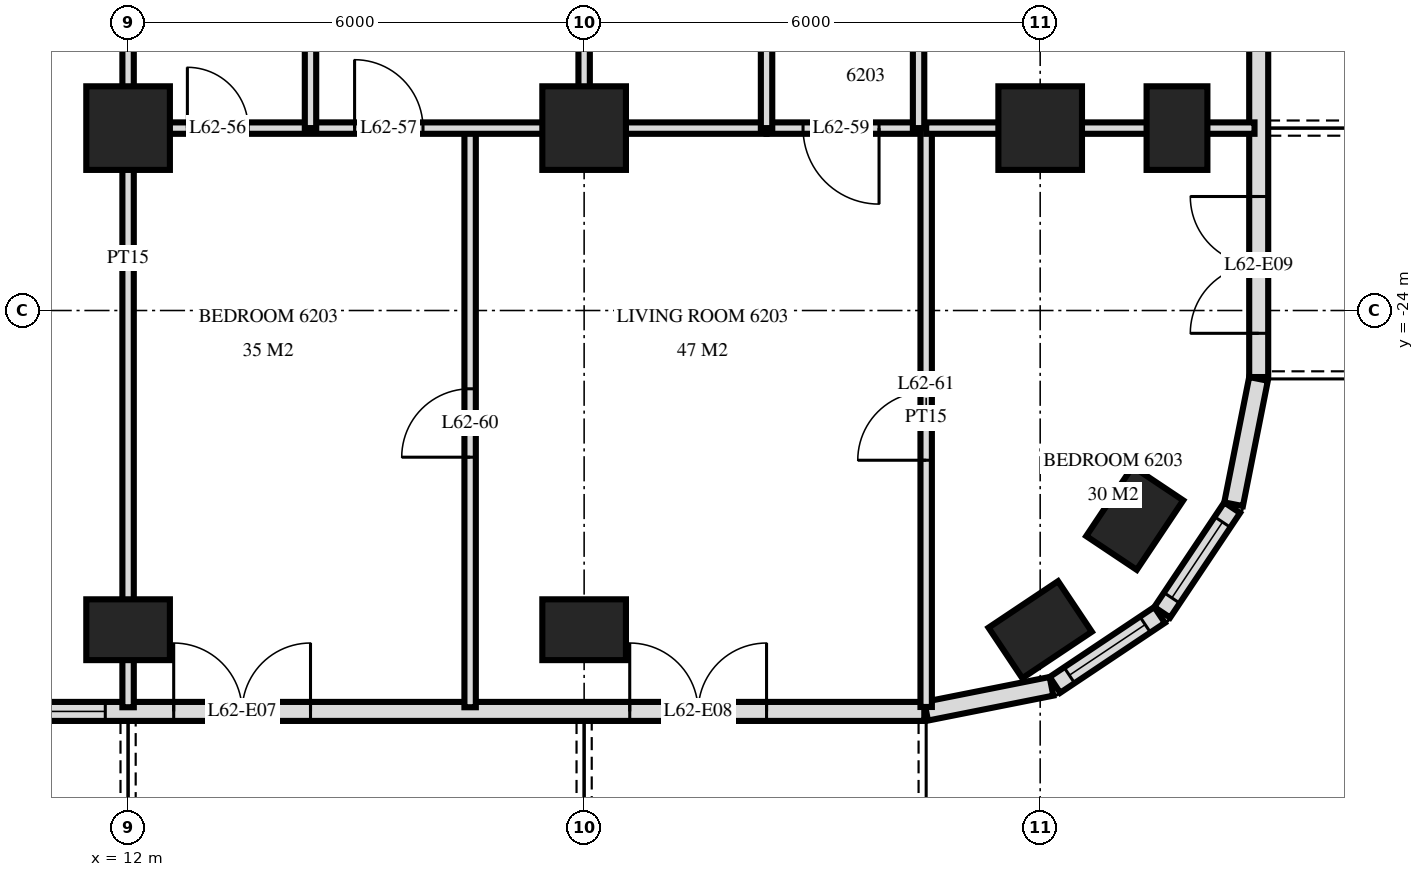
"""IFC4 building model, lengths in metres.
Left out: names, types, materials, properties, quantities, classifications, styles, units other than length and angle.
Written with IfcOpenShell. Run it as: python <this file> out.ifc"""

import sys

from ifc_helpers import new_model, si_unit, direction, frame, frame_2d, origin, origin_2d, place, context, subcontext, project, spatial, rectangle, extrude, element, fill, save


model = new_model("IFC4")
c1 = context("Model", 3, precision=1e-05, world=origin(), true_north=direction((0.0, 1.0)))
c2 = subcontext(c1, "Body", "Model", "MODEL_VIEW")
j1 = project(units=[si_unit("LENGTHUNIT", "METRE"), si_unit("PLANEANGLEUNIT", "RADIAN")], contexts=[c1])
p1 = place(None, origin())
s1 = spatial("IfcSite", under=j1, at=p1, CompositionType="ELEMENT")
p2 = place(p1, origin())
s2 = spatial("IfcBuilding", under=s1, at=p2, CompositionType="ELEMENT")
p3 = place(p2, frame((0.0, 0.0, 236.1)))
s3 = spatial("IfcBuildingStorey", under=s2, at=p3, CompositionType="ELEMENT", Elevation=236.1)
p4 = place(p3, frame((12.0, -28.2, 0.0), z_axis=(0.0, 0.0, 1.0), x_axis=(1.0, 0.0, 0.0)))
e1 = element("IfcColumn", 1, at=p4, inside=s3, PredefinedType="COLUMN", context=c2, shape_type="SweptSolid", body=[
    extrude(rectangle(XDim=1.1, YDim=0.8, at=origin_2d()), origin(), (0.0, 0.0, 1.0), 3.5),
])
p5 = place(p3, frame((12.0, -21.6, 0.0), z_axis=(0.0, 0.0, 1.0), x_axis=(1.0, 0.0, 0.0)))
e2 = element("IfcColumn", 2, at=p5, inside=s3, PredefinedType="COLUMN", context=c2, shape_type="SweptSolid", body=[
    extrude(rectangle(XDim=1.1, YDim=1.1, at=origin_2d()), origin(), (0.0, 0.0, 1.0), 3.5),
])
p6 = place(p3, frame((18.0, -28.2, 0.0), z_axis=(0.0, 0.0, 1.0), x_axis=(1.0, 0.0, 0.0)))
e3 = element("IfcColumn", 3, at=p6, inside=s3, PredefinedType="COLUMN", context=c2, shape_type="SweptSolid", body=[
    extrude(rectangle(XDim=1.1, YDim=0.8, at=origin_2d()), origin(), (0.0, 0.0, 1.0), 3.5),
])
p7 = place(p3, frame((18.0, -21.6, 0.0), z_axis=(0.0, 0.0, 1.0), x_axis=(1.0, 0.0, 0.0)))
e4 = element("IfcColumn", 4, at=p7, inside=s3, PredefinedType="COLUMN", context=c2, shape_type="SweptSolid", body=[
    extrude(rectangle(XDim=1.1, YDim=1.1, at=origin_2d()), origin(), (0.0, 0.0, 1.0), 3.5),
])
p8 = place(p3, frame((24.0, -28.2, 0.0), z_axis=(0.0, 0.0, 1.0), x_axis=(0.831459915646, 0.555584744817, 0.0)))
e5 = element("IfcColumn", 5, at=p8, inside=s3, PredefinedType="COLUMN", context=c2, shape_type="SweptSolid", body=[
    extrude(rectangle(XDim=1.1, YDim=0.8, at=origin_2d()), origin(), (0.0, 0.0, 1.0), 3.5),
])
p9 = place(p3, frame((24.0, -21.6, 0.0), z_axis=(0.0, 0.0, 1.0), x_axis=(1.0, 0.0, 0.0)))
e6 = element("IfcColumn", 6, at=p9, inside=s3, PredefinedType="COLUMN", context=c2, shape_type="SweptSolid", body=[
    extrude(rectangle(XDim=1.1, YDim=1.1, at=origin_2d()), origin(), (0.0, 0.0, 1.0), 3.5),
])
for number, where, z_axis, x_axis in (
    (7, (25.244, -26.733, 0.0), (0.0, 0.0, 1.0), (0.556, 0.831, 0.0)),
    (8, (25.8, -21.6, 0.0), (0.0, 0.0, 1.0), (0.0, 1.0, 0.0)),
):
    element("IfcColumn", number, at=place(p3, frame(where, z_axis=z_axis, x_axis=x_axis)), inside=s3, PredefinedType="COLUMN", context=c2, shape_type="SweptSolid", body=[
        extrude(rectangle(XDim=1.1, YDim=0.8, at=origin_2d()), origin(), (0.0, 0.0, 1.0), 3.5),
    ])
p10 = place(p3, frame((-22.475, -29.275, 0.0), z_axis=(0.0, 0.0, 1.0), x_axis=(1.0, 0.0, 0.0)))
e9 = element("IfcWall", 9, at=p10, inside=s3, PredefinedType="SOLIDWALL", context=c2, shape_type="SweptSolid", body=[
    extrude(rectangle(XDim=44.951, YDim=0.25, at=frame_2d((22.475, 0.0))), origin(), (0.0, 0.0, 1.0), 3.22),
])
p11 = place(p10, frame((0.575, 0.0, 0.0)))
e10 = element("IfcOpeningElement", 10, at=p11, cuts=e9, PredefinedType="OPENING", context=c2, shape_type="SweptSolid", body=[
    extrude(rectangle(XDim=1.8, YDim=2.4, at=frame_2d((0.9, 1.2))), frame((0.0, 0.135, 0.0), z_axis=(0.0, -1.0, 0.0), x_axis=(1.0, 0.0, 0.0)), (0.0, 0.0, 1.0), 0.27),
])
p12 = place(p10, frame((4.775, 0.0, 0.9)))
e11 = element("IfcOpeningElement", 11, at=p12, cuts=e9, PredefinedType="OPENING", context=c2, shape_type="SweptSolid", body=[
    extrude(rectangle(XDim=2.4, YDim=1.5, at=frame_2d((1.2, 0.75))), frame((0.0, 0.135, 0.0), z_axis=(0.0, -1.0, 0.0), x_axis=(1.0, 0.0, 0.0)), (0.0, 0.0, 1.0), 0.27),
])
p13 = place(p10, frame((8.075, 0.0, 0.0)))
e12 = element("IfcOpeningElement", 12, at=p13, cuts=e9, PredefinedType="OPENING", context=c2, shape_type="SweptSolid", body=[
    extrude(rectangle(XDim=1.8, YDim=2.4, at=frame_2d((0.9, 1.2))), frame((0.0, 0.135, 0.0), z_axis=(0.0, -1.0, 0.0), x_axis=(1.0, 0.0, 0.0)), (0.0, 0.0, 1.0), 0.27),
])
p14 = place(p10, frame((11.075, 0.0, 0.0)))
e13 = element("IfcOpeningElement", 13, at=p14, cuts=e9, PredefinedType="OPENING", context=c2, shape_type="SweptSolid", body=[
    extrude(rectangle(XDim=1.8, YDim=2.4, at=frame_2d((0.9, 1.2))), frame((0.0, 0.135, 0.0), z_axis=(0.0, -1.0, 0.0), x_axis=(1.0, 0.0, 0.0)), (0.0, 0.0, 1.0), 0.27),
])
p15 = place(p10, frame((13.775, 0.0, 0.9)))
e14 = element("IfcOpeningElement", 14, at=p15, cuts=e9, PredefinedType="OPENING", context=c2, shape_type="SweptSolid", body=[
    extrude(rectangle(XDim=2.4, YDim=1.5, at=frame_2d((1.2, 0.75))), frame((0.0, 0.135, 0.0), z_axis=(0.0, -1.0, 0.0), x_axis=(1.0, 0.0, 0.0)), (0.0, 0.0, 1.0), 0.27),
])
p16 = place(p10, frame((16.775, 0.0, 0.9)))
e15 = element("IfcOpeningElement", 15, at=p16, cuts=e9, PredefinedType="OPENING", context=c2, shape_type="SweptSolid", body=[
    extrude(rectangle(XDim=2.4, YDim=1.5, at=frame_2d((1.2, 0.75))), frame((0.0, 0.135, 0.0), z_axis=(0.0, -1.0, 0.0), x_axis=(1.0, 0.0, 0.0)), (0.0, 0.0, 1.0), 0.27),
])
p17 = place(p10, frame((20.075, 0.0, 0.0)))
e16 = element("IfcOpeningElement", 16, at=p17, cuts=e9, PredefinedType="OPENING", context=c2, shape_type="SweptSolid", body=[
    extrude(rectangle(XDim=1.8, YDim=2.4, at=frame_2d((0.9, 1.2))), frame((0.0, 0.135, 0.0), z_axis=(0.0, -1.0, 0.0), x_axis=(1.0, 0.0, 0.0)), (0.0, 0.0, 1.0), 0.27),
])
p18 = place(p10, frame((23.075, 0.0, 0.0)))
e17 = element("IfcOpeningElement", 17, at=p18, cuts=e9, PredefinedType="OPENING", context=c2, shape_type="SweptSolid", body=[
    extrude(rectangle(XDim=1.8, YDim=2.4, at=frame_2d((0.9, 1.2))), frame((0.0, 0.135, 0.0), z_axis=(0.0, -1.0, 0.0), x_axis=(1.0, 0.0, 0.0)), (0.0, 0.0, 1.0), 0.27),
])
p19 = place(p10, frame((25.775, 0.0, 0.9)))
e18 = element("IfcOpeningElement", 18, at=p19, cuts=e9, PredefinedType="OPENING", context=c2, shape_type="SweptSolid", body=[
    extrude(rectangle(XDim=2.4, YDim=1.5, at=frame_2d((1.2, 0.75))), frame((0.0, 0.135, 0.0), z_axis=(0.0, -1.0, 0.0), x_axis=(1.0, 0.0, 0.0)), (0.0, 0.0, 1.0), 0.27),
])
p20 = place(p10, frame((29.075, 0.0, 0.0)))
e19 = element("IfcOpeningElement", 19, at=p20, cuts=e9, PredefinedType="OPENING", context=c2, shape_type="SweptSolid", body=[
    extrude(rectangle(XDim=1.8, YDim=2.4, at=frame_2d((0.9, 1.2))), frame((0.0, 0.135, 0.0), z_axis=(0.0, -1.0, 0.0), x_axis=(1.0, 0.0, 0.0)), (0.0, 0.0, 1.0), 0.27),
])
p21 = place(p10, frame((31.775, 0.0, 0.9)))
e20 = element("IfcOpeningElement", 20, at=p21, cuts=e9, PredefinedType="OPENING", context=c2, shape_type="SweptSolid", body=[
    extrude(rectangle(XDim=2.4, YDim=1.5, at=frame_2d((1.2, 0.75))), frame((0.0, 0.135, 0.0), z_axis=(0.0, -1.0, 0.0), x_axis=(1.0, 0.0, 0.0)), (0.0, 0.0, 1.0), 0.27),
])
p22 = place(p10, frame((35.075, 0.0, 0.0)))
e21 = element("IfcOpeningElement", 21, at=p22, cuts=e9, PredefinedType="OPENING", context=c2, shape_type="SweptSolid", body=[
    extrude(rectangle(XDim=1.8, YDim=2.4, at=frame_2d((0.9, 1.2))), frame((0.0, 0.135, 0.0), z_axis=(0.0, -1.0, 0.0), x_axis=(1.0, 0.0, 0.0)), (0.0, 0.0, 1.0), 0.27),
])
p23 = place(p10, frame((41.075, 0.0, 0.0)))
e22 = element("IfcOpeningElement", 22, at=p23, cuts=e9, PredefinedType="OPENING", context=c2, shape_type="SweptSolid", body=[
    extrude(rectangle(XDim=1.8, YDim=2.4, at=frame_2d((0.9, 1.2))), frame((0.0, 0.135, 0.0), z_axis=(0.0, -1.0, 0.0), x_axis=(1.0, 0.0, 0.0)), (0.0, 0.0, 1.0), 0.27),
])
p24 = place(p3, frame((22.5, -29.273, 0.0), z_axis=(0.0, 0.0, 1.0), x_axis=(0.980775640221, 0.19513878023, 0.0)))
e23 = element("IfcWall", 23, at=p24, inside=s3, PredefinedType="SOLIDWALL", context=c2, shape_type="SweptSolid", body=[
    extrude(rectangle(XDim=1.681, YDim=0.25, at=frame_2d((0.841, 0.0))), origin(), (0.0, 0.0, 1.0), 3.22),
])
p25 = place(p3, frame((24.194, -28.926, 0.0), z_axis=(0.0, 0.0, 1.0), x_axis=(0.831482937015, 0.55555029066, 0.0)))
e24 = element("IfcWall", 24, at=p25, inside=s3, PredefinedType="SOLIDWALL", context=c2, shape_type="SweptSolid", body=[
    extrude(rectangle(XDim=1.656, YDim=0.25, at=frame_2d((0.828, 0.0))), origin(), (0.0, 0.0, 1.0), 3.22),
])
p26 = place(p25, frame((0.228, 0.0, 0.9)))
e25 = element("IfcOpeningElement", 25, at=p26, cuts=e24, PredefinedType="OPENING", context=c2, shape_type="SweptSolid", body=[
    extrude(rectangle(XDim=1.2, YDim=1.5, at=frame_2d((0.6, 0.75))), frame((0.0, 0.135, 0.0), z_axis=(0.0, -1.0, 0.0), x_axis=(1.0, 0.0, 0.0)), (0.0, 0.0, 1.0), 0.27),
])
p27 = place(p3, frame((25.606, -27.971, 0.0), z_axis=(0.0, 0.0, 1.0), x_axis=(0.55555029066, 0.831482937015, 0.0)))
e26 = element("IfcWall", 26, at=p27, inside=s3, PredefinedType="SOLIDWALL", context=c2, shape_type="SweptSolid", body=[
    extrude(rectangle(XDim=1.656, YDim=0.25, at=frame_2d((0.828, 0.0))), origin(), (0.0, 0.0, 1.0), 3.22),
])
p28 = place(p27, frame((0.228, 0.0, 0.9)))
e27 = element("IfcOpeningElement", 27, at=p28, cuts=e26, PredefinedType="OPENING", context=c2, shape_type="SweptSolid", body=[
    extrude(rectangle(XDim=1.2, YDim=1.5, at=frame_2d((0.6, 0.75))), frame((0.0, 0.135, 0.0), z_axis=(0.0, -1.0, 0.0), x_axis=(1.0, 0.0, 0.0)), (0.0, 0.0, 1.0), 0.27),
])
p29 = place(p3, frame((26.545, -26.549, 0.0), z_axis=(0.0, 0.0, 1.0), x_axis=(0.195026884138, 0.980797896849, 0.0)))
e28 = element("IfcWall", 28, at=p29, inside=s3, PredefinedType="SOLIDWALL", context=c2, shape_type="SweptSolid", body=[
    extrude(rectangle(XDim=1.681, YDim=0.25, at=frame_2d((0.841, 0.0))), origin(), (0.0, 0.0, 1.0), 3.22),
])
p30 = place(p3, frame((26.875, -24.875, 0.0), z_axis=(0.0, 0.0, 1.0), x_axis=(0.0, 1.0, 0.0)))
e29 = element("IfcWall", 29, at=p30, inside=s3, PredefinedType="SOLIDWALL", context=c2, shape_type="SweptSolid", body=[
    extrude(rectangle(XDim=21.551, YDim=0.25, at=frame_2d((10.775, 0.0))), origin(), (0.0, 0.0, 1.0), 3.22),
])
p31 = place(p30, frame((0.575, 0.0, 0.0)))
e30 = element("IfcOpeningElement", 30, at=p31, cuts=e29, PredefinedType="OPENING", context=c2, shape_type="SweptSolid", body=[
    extrude(rectangle(XDim=1.8, YDim=2.4, at=frame_2d((0.9, 1.2))), frame((0.0, 0.135, 0.0), z_axis=(0.0, -1.0, 0.0), x_axis=(1.0, 0.0, 0.0)), (0.0, 0.0, 1.0), 0.27),
])
p32 = place(p30, frame((4.475, 0.0, 0.0)))
e31 = element("IfcOpeningElement", 31, at=p32, cuts=e29, PredefinedType="OPENING", context=c2, shape_type="SweptSolid", body=[
    extrude(rectangle(XDim=1.8, YDim=2.4, at=frame_2d((0.9, 1.2))), frame((0.0, 0.135, 0.0), z_axis=(0.0, -1.0, 0.0), x_axis=(1.0, 0.0, 0.0)), (0.0, 0.0, 1.0), 0.27),
])
p33 = place(p30, frame((8.075, 0.0, 0.9)))
e32 = element("IfcOpeningElement", 32, at=p33, cuts=e29, PredefinedType="OPENING", context=c2, shape_type="SweptSolid", body=[
    extrude(rectangle(XDim=1.2, YDim=1.5, at=frame_2d((0.6, 0.75))), frame((0.0, 0.135, 0.0), z_axis=(0.0, -1.0, 0.0), x_axis=(1.0, 0.0, 0.0)), (0.0, 0.0, 1.0), 0.27),
])
p34 = place(p30, frame((12.225, 0.0, 0.0)))
e33 = element("IfcOpeningElement", 33, at=p34, cuts=e29, PredefinedType="OPENING", context=c2, shape_type="SweptSolid", body=[
    extrude(rectangle(XDim=1.8, YDim=2.4, at=frame_2d((0.9, 1.2))), frame((0.0, 0.135, 0.0), z_axis=(0.0, -1.0, 0.0), x_axis=(1.0, 0.0, 0.0)), (0.0, 0.0, 1.0), 0.27),
])
p35 = place(p3, frame((22.5, -29.217, 0.0), z_axis=(0.0, 0.0, 1.0), x_axis=(0.0, 1.0, 0.0)))
e34 = element("IfcWall", 34, at=p35, inside=s3, PredefinedType="PARTITIONING", context=c2, shape_type="SweptSolid", body=[
    extrude(rectangle(XDim=7.616, YDim=0.15, at=frame_2d((3.808, 0.0))), origin(), (0.0, 0.0, 1.0), 3.22),
])
p36 = place(p35, frame((3.247, 0.0, 0.0)))
e35 = element("IfcOpeningElement", 35, at=p36, cuts=e34, PredefinedType="OPENING", context=c2, shape_type="SweptSolid", body=[
    extrude(rectangle(XDim=0.9, YDim=2.1, at=frame_2d((0.45, 1.05))), frame((0.0, 0.085, 0.0), z_axis=(0.0, -1.0, 0.0), x_axis=(1.0, 0.0, 0.0)), (0.0, 0.0, 1.0), 0.17),
])
p37 = place(p3, frame((22.4, -21.6, 0.0), z_axis=(0.0, 0.0, 1.0), x_axis=(0.0, 1.0, 0.0)))
e36 = element("IfcWall", 36, at=p37, inside=s3, PredefinedType="PARTITIONING", context=c2, shape_type="SweptSolid", body=[
    extrude(rectangle(XDim=4.2, YDim=0.15, at=frame_2d((2.1, 0.0))), origin(), (0.0, 0.0, 1.0), 3.22),
])
p38 = place(p3, frame((20.4, -21.6, 0.0), z_axis=(0.0, 0.0, 1.0), x_axis=(0.0, 1.0, 0.0)))
e37 = element("IfcWall", 37, at=p38, inside=s3, PredefinedType="PARTITIONING", context=c2, shape_type="SweptSolid", body=[
    extrude(rectangle(XDim=4.2, YDim=0.15, at=frame_2d((2.1, 0.0))), origin(), (0.0, 0.0, 1.0), 3.22),
])
p39 = place(p38, frame((1.6, 0.0, 0.0)))
e38 = element("IfcOpeningElement", 38, at=p39, cuts=e37, PredefinedType="OPENING", context=c2, shape_type="SweptSolid", body=[
    extrude(rectangle(XDim=1.0, YDim=2.1, at=frame_2d((0.5, 1.05))), frame((0.0, 0.085, 0.0), z_axis=(0.0, -1.0, 0.0), x_axis=(1.0, 0.0, 0.0)), (0.0, 0.0, 1.0), 0.17),
])
p40 = place(p3, frame((18.0, -21.6, 0.0), z_axis=(0.0, 0.0, 1.0), x_axis=(0.0, 1.0, 0.0)))
e39 = element("IfcWall", 39, at=p40, inside=s3, PredefinedType="PARTITIONING", context=c2, shape_type="SweptSolid", body=[
    extrude(rectangle(XDim=4.2, YDim=0.15, at=frame_2d((2.1, 0.0))), origin(), (0.0, 0.0, 1.0), 3.22),
])
p41 = place(p3, frame((16.5, -29.22, 0.0), z_axis=(0.0, 0.0, 1.0), x_axis=(0.0, 1.0, 0.0)))
e40 = element("IfcWall", 40, at=p41, inside=s3, PredefinedType="PARTITIONING", context=c2, shape_type="SweptSolid", body=[
    extrude(rectangle(XDim=7.62, YDim=0.15, at=frame_2d((3.81, 0.0))), origin(), (0.0, 0.0, 1.0), 3.22),
])
p42 = place(p41, frame((3.29, 0.0, 0.0)))
e41 = element("IfcOpeningElement", 41, at=p42, cuts=e40, PredefinedType="OPENING", context=c2, shape_type="SweptSolid", body=[
    extrude(rectangle(XDim=0.9, YDim=2.1, at=frame_2d((0.45, 1.05))), frame((0.0, 0.085, 0.0), z_axis=(0.0, -1.0, 0.0), x_axis=(1.0, 0.0, 0.0)), (0.0, 0.0, 1.0), 0.17),
])
p43 = place(p3, frame((14.4, -21.6, 0.0), z_axis=(0.0, 0.0, 1.0), x_axis=(0.0, 1.0, 0.0)))
e42 = element("IfcWall", 42, at=p43, inside=s3, PredefinedType="PARTITIONING", context=c2, shape_type="SweptSolid", body=[
    extrude(rectangle(XDim=4.2, YDim=0.15, at=frame_2d((2.1, 0.0))), origin(), (0.0, 0.0, 1.0), 3.22),
])
p44 = place(p3, frame((12.0, -29.22, 0.0), z_axis=(0.0, 0.0, 1.0), x_axis=(0.0, 1.0, 0.0)))
e43 = element("IfcWall", 43, at=p44, inside=s3, PredefinedType="PARTITIONING", context=c2, shape_type="SweptSolid", body=[
    extrude(rectangle(XDim=11.82, YDim=0.15, at=frame_2d((5.91, 0.0))), origin(), (0.0, 0.0, 1.0), 3.22),
])
p45 = place(p3, frame((20.4, -21.6, 0.0), z_axis=(0.0, 0.0, 1.0), x_axis=(1.0, 0.0, 0.0)))
e44 = element("IfcWall", 44, at=p45, inside=s3, PredefinedType="PARTITIONING", context=c2, shape_type="SweptSolid", body=[
    extrude(rectangle(XDim=2.0, YDim=0.15, at=frame_2d((1.0, 0.0))), origin(), (0.0, 0.0, 1.0), 3.22),
])
p46 = place(p45, frame((0.48, 0.0, 0.0)))
e45 = element("IfcOpeningElement", 45, at=p46, cuts=e44, PredefinedType="OPENING", context=c2, shape_type="SweptSolid", body=[
    extrude(rectangle(XDim=1.0, YDim=2.1, at=frame_2d((0.5, 1.05))), frame((0.0, 0.085, 0.0), z_axis=(0.0, -1.0, 0.0), x_axis=(1.0, 0.0, 0.0)), (0.0, 0.0, 1.0), 0.17),
])
p47 = place(p3, frame((12.0, -21.6, 0.0), z_axis=(0.0, 0.0, 1.0), x_axis=(1.0, 0.0, 0.0)))
e46 = element("IfcWall", 46, at=p47, inside=s3, PredefinedType="PARTITIONING", context=c2, shape_type="SweptSolid", body=[
    extrude(rectangle(XDim=8.4, YDim=0.15, at=frame_2d((4.2, 0.0))), origin(), (0.0, 0.0, 1.0), 3.22),
])
p48 = place(p47, frame((0.78, 0.0, 0.0)))
e47 = element("IfcOpeningElement", 47, at=p48, cuts=e46, PredefinedType="OPENING", context=c2, shape_type="SweptSolid", body=[
    extrude(rectangle(XDim=0.8, YDim=2.1, at=frame_2d((0.4, 1.05))), frame((0.0, 0.085, 0.0), z_axis=(0.0, -1.0, 0.0), x_axis=(1.0, 0.0, 0.0)), (0.0, 0.0, 1.0), 0.17),
])
p49 = place(p47, frame((2.98, 0.0, 0.0)))
e48 = element("IfcOpeningElement", 48, at=p49, cuts=e46, PredefinedType="OPENING", context=c2, shape_type="SweptSolid", body=[
    extrude(rectangle(XDim=0.9, YDim=2.1, at=frame_2d((0.45, 1.05))), frame((0.0, 0.085, 0.0), z_axis=(0.0, -1.0, 0.0), x_axis=(1.0, 0.0, 0.0)), (0.0, 0.0, 1.0), 0.17),
])
p50 = place(p3, frame((22.5, -21.6, 0.0), z_axis=(0.0, 0.0, 1.0), x_axis=(1.0, 0.0, 0.0)))
e49 = element("IfcWall", 49, at=p50, inside=s3, PredefinedType="PARTITIONING", context=c2, shape_type="SweptSolid", body=[
    extrude(rectangle(XDim=4.32, YDim=0.15, at=frame_2d((2.16, 0.0))), origin(), (0.0, 0.0, 1.0), 3.22),
])
p51 = place(p26, origin())
e50 = element("IfcWindow", 50, at=p51, inside=s3, PartitioningType="SINGLE_PANEL", PredefinedType="WINDOW", context=c2, shape_type="SweptSolid", body=[
    extrude(rectangle(XDim=1.2, YDim=1.5, at=frame_2d((0.6, 0.75))), frame((0.0, 0.03, 0.0), z_axis=(0.0, -1.0, 0.0), x_axis=(1.0, 0.0, 0.0)), (0.0, 0.0, 1.0), 0.06),
])
fill(e25, e50)
p52 = place(p28, origin())
e51 = element("IfcWindow", 51, at=p52, inside=s3, PartitioningType="SINGLE_PANEL", PredefinedType="WINDOW", context=c2, shape_type="SweptSolid", body=[
    extrude(rectangle(XDim=1.2, YDim=1.5, at=frame_2d((0.6, 0.75))), frame((0.0, 0.03, 0.0), z_axis=(0.0, -1.0, 0.0), x_axis=(1.0, 0.0, 0.0)), (0.0, 0.0, 1.0), 0.06),
])
fill(e27, e51)
p53 = place(p21, origin())
e52 = element("IfcWindow", 52, at=p53, inside=s3, PartitioningType="SINGLE_PANEL", PredefinedType="WINDOW", context=c2, shape_type="SweptSolid", body=[
    extrude(rectangle(XDim=2.4, YDim=1.5, at=frame_2d((1.2, 0.75))), frame((0.0, 0.03, 0.0), z_axis=(0.0, -1.0, 0.0), x_axis=(1.0, 0.0, 0.0)), (0.0, 0.0, 1.0), 0.06),
])
fill(e20, e52)
p54 = place(p22, origin())
e53 = element("IfcDoor", 53, at=p54, inside=s3, OperationType="DOUBLE_DOOR_SINGLE_SWING", PredefinedType="DOOR", context=c2, shape_type="SweptSolid", body=[
    extrude(rectangle(XDim=1.8, YDim=2.4, at=frame_2d((0.9, 1.2))), frame((0.0, 0.025, 0.0), z_axis=(0.0, -1.0, 0.0), x_axis=(1.0, 0.0, 0.0)), (0.0, 0.0, 1.0), 0.05),
])
fill(e21, e53)
p55 = place(p23, origin())
e54 = element("IfcDoor", 54, at=p55, inside=s3, OperationType="DOUBLE_DOOR_SINGLE_SWING", PredefinedType="DOOR", context=c2, shape_type="SweptSolid", body=[
    extrude(rectangle(XDim=1.8, YDim=2.4, at=frame_2d((0.9, 1.2))), frame((0.0, 0.025, 0.0), z_axis=(0.0, -1.0, 0.0), x_axis=(1.0, 0.0, 0.0)), (0.0, 0.0, 1.0), 0.05),
])
fill(e22, e54)
p56 = place(p31, origin())
e55 = element("IfcDoor", 55, at=p56, inside=s3, OperationType="DOUBLE_DOOR_SINGLE_SWING", PredefinedType="DOOR", context=c2, shape_type="SweptSolid", body=[
    extrude(rectangle(XDim=1.8, YDim=2.4, at=frame_2d((0.9, 1.2))), frame((0.0, 0.025, 0.0), z_axis=(0.0, -1.0, 0.0), x_axis=(1.0, 0.0, 0.0)), (0.0, 0.0, 1.0), 0.05),
])
fill(e30, e55)
p57 = place(p48, origin())
e56 = element("IfcDoor", 56, at=p57, inside=s3, OperationType="SINGLE_SWING_RIGHT", PredefinedType="DOOR", context=c2, shape_type="SweptSolid", body=[
    extrude(rectangle(XDim=0.8, YDim=2.1, at=frame_2d((0.4, 1.05))), frame((0.0, 0.025, 0.0), z_axis=(0.0, -1.0, 0.0), x_axis=(1.0, 0.0, 0.0)), (0.0, 0.0, 1.0), 0.05),
])
fill(e47, e56)
p58 = place(p49, origin())
e57 = element("IfcDoor", 57, at=p58, inside=s3, OperationType="SINGLE_SWING_RIGHT", PredefinedType="DOOR", context=c2, shape_type="SweptSolid", body=[
    extrude(rectangle(XDim=0.9, YDim=2.1, at=frame_2d((0.45, 1.05))), frame((0.0, 0.025, 0.0), z_axis=(0.0, -1.0, 0.0), x_axis=(1.0, 0.0, 0.0)), (0.0, 0.0, 1.0), 0.05),
])
fill(e48, e57)
p59 = place(p46, frame((0.5, 0.0, 0.0), z_axis=(0.0, 0.0, 1.0), x_axis=(-1.0, 0.0, 0.0)))
e58 = element("IfcDoor", 58, at=p59, inside=s3, OperationType="SINGLE_SWING_RIGHT", PredefinedType="DOOR", context=c2, shape_type="SweptSolid", body=[
    extrude(rectangle(XDim=1.0, YDim=2.1, at=frame_2d((0.0, 1.05))), frame((0.0, -0.025, 0.0), z_axis=(0.0, 1.0, 0.0), x_axis=(-1.0, 0.0, 0.0)), (0.0, 0.0, 1.0), 0.05),
])
fill(e45, e58)
p60 = place(p42, origin())
e59 = element("IfcDoor", 59, at=p60, inside=s3, OperationType="SINGLE_SWING_RIGHT", PredefinedType="DOOR", context=c2, shape_type="SweptSolid", body=[
    extrude(rectangle(XDim=0.9, YDim=2.1, at=frame_2d((0.45, 1.05))), frame((0.0, 0.025, 0.0), z_axis=(0.0, -1.0, 0.0), x_axis=(1.0, 0.0, 0.0)), (0.0, 0.0, 1.0), 0.05),
])
fill(e41, e59)
p61 = place(p36, origin())
e60 = element("IfcDoor", 60, at=p61, inside=s3, OperationType="SINGLE_SWING_RIGHT", PredefinedType="DOOR", context=c2, shape_type="SweptSolid", body=[
    extrude(rectangle(XDim=0.9, YDim=2.1, at=frame_2d((0.45, 1.05))), frame((0.0, 0.025, 0.0), z_axis=(0.0, -1.0, 0.0), x_axis=(1.0, 0.0, 0.0)), (0.0, 0.0, 1.0), 0.05),
])
fill(e35, e60)
save(model, sys.argv[1])
